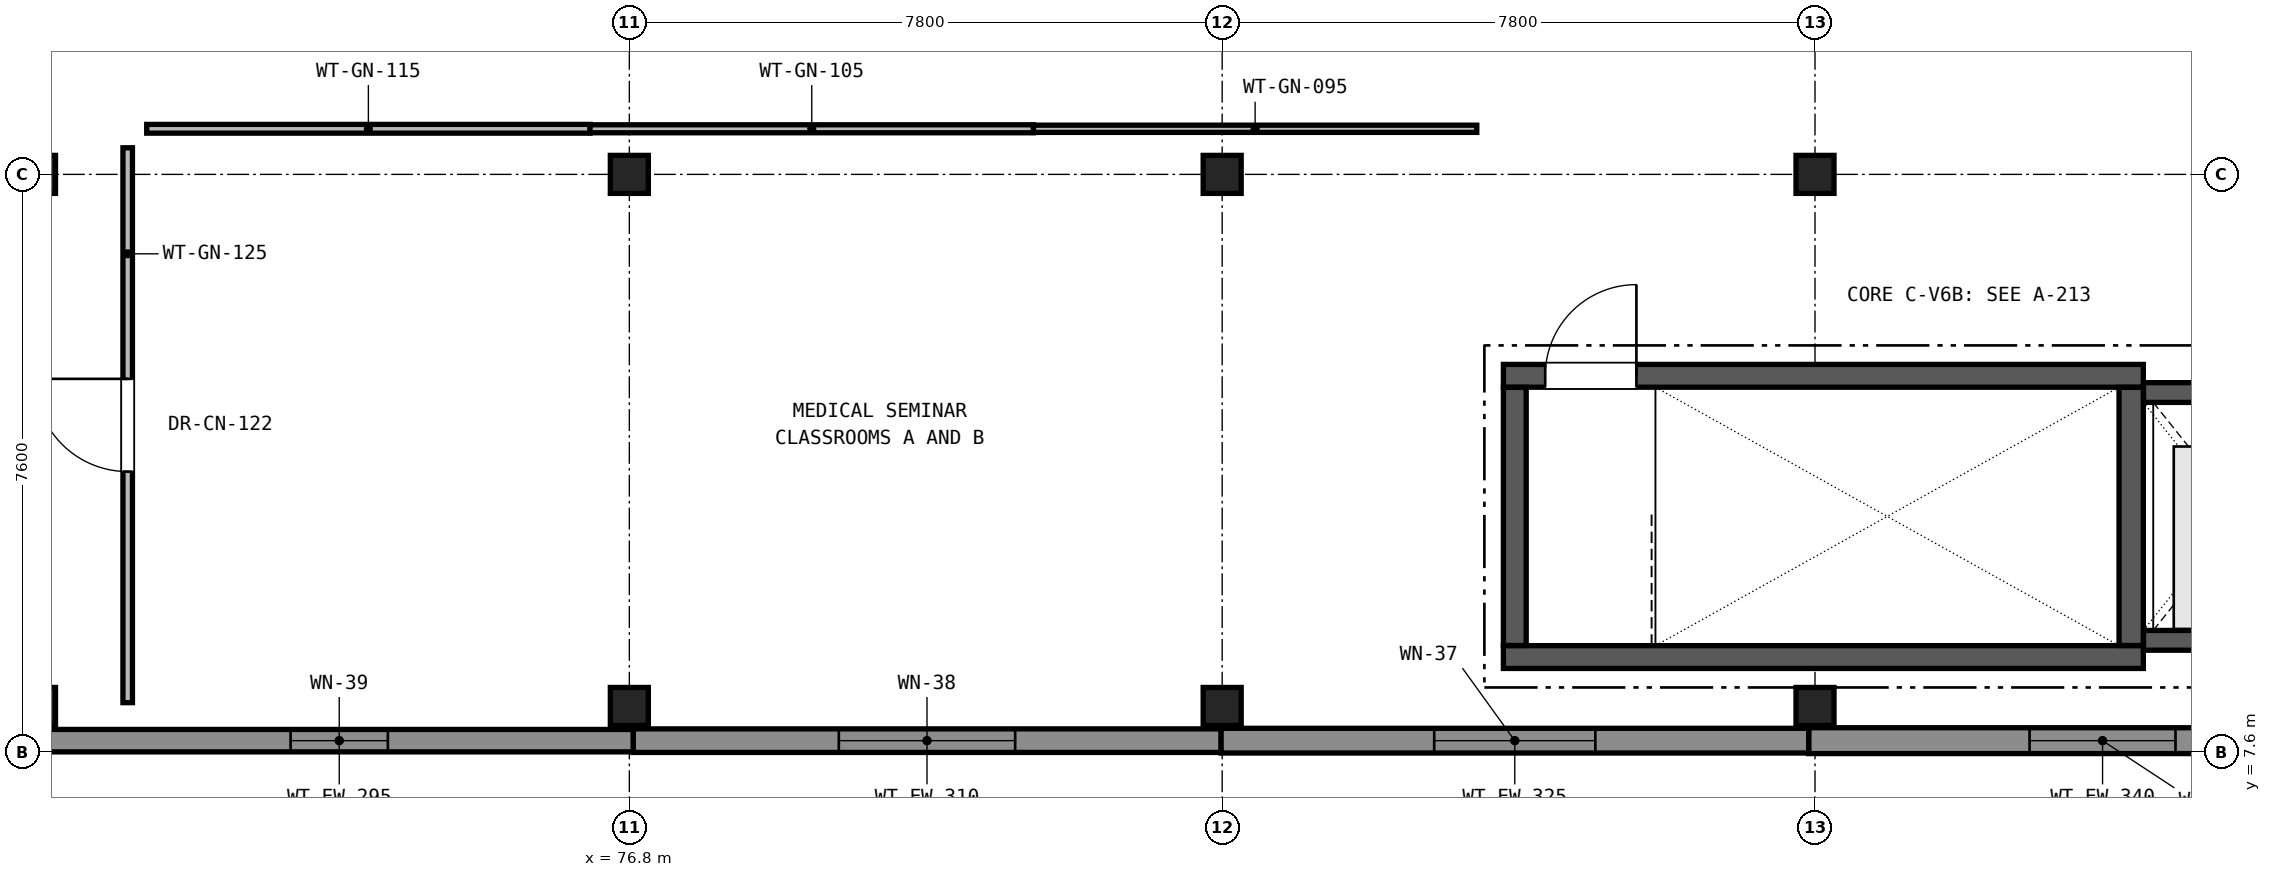
"""IFC4 building model, lengths in metres.
Left out: names, types, materials, properties, quantities, classifications, styles, units other than length and angle.
Written with IfcOpenShell. Run it as: python <this file> out.ifc"""

import sys

from ifc_helpers import new_model, si_unit, direction, frame, frame_2d, origin, origin_2d, place, context, subcontext, project, spatial, rectangle, extrude, element, fill, save


model = new_model("IFC4")
c1 = context("Model", 3, precision=1e-05, world=origin(), true_north=direction((0.0, 1.0)))
c2 = subcontext(c1, "Body", "Model", "MODEL_VIEW")
j1 = project(units=[si_unit("LENGTHUNIT", "METRE"), si_unit("PLANEANGLEUNIT", "RADIAN")], contexts=[c1])
p1 = place(None, origin())
s1 = spatial("IfcSite", under=j1, at=p1, CompositionType="ELEMENT")
p2 = place(p1, origin())
s2 = spatial("IfcBuilding", under=s1, at=p2, CompositionType="ELEMENT")
p3 = place(p2, frame((0.0, 0.0, 17.68)))
s3 = spatial("IfcBuildingStorey", under=s2, at=p3, CompositionType="ELEMENT", Elevation=17.68)
for number, where, z_axis, x_axis in (
    (1, (69.0, 8.2, 0.0), (0.0, 0.0, 1.0), (1.0, 0.0, 0.0)),
    (2, (69.0, 15.2, 0.0), (0.0, 0.0, 1.0), (1.0, 0.0, 0.0)),
    (3, (76.8, 8.2, 0.0), (0.0, 0.0, 1.0), (1.0, 0.0, 0.0)),
    (4, (76.8, 15.2, 0.0), (0.0, 0.0, 1.0), (1.0, 0.0, 0.0)),
    (5, (84.6, 8.2, 0.0), (0.0, 0.0, 1.0), (1.0, 0.0, 0.0)),
    (6, (84.6, 15.2, 0.0), (0.0, 0.0, 1.0), (1.0, 0.0, 0.0)),
    (7, (92.4, 8.2, 0.0), (0.0, 0.0, 1.0), (1.0, 0.0, 0.0)),
    (8, (92.4, 15.2, 0.0), (0.0, 0.0, 1.0), (1.0, 0.0, 0.0)),
):
    element("IfcColumn", number, at=place(p3, frame(where, z_axis=z_axis, x_axis=x_axis)), inside=s3, PredefinedType="COLUMN", context=c2, shape_type="SweptSolid", body=[
        extrude(rectangle(XDim=0.5, YDim=0.5, at=origin_2d()), origin(), (0.0, 0.0, 1.0), 4.08),
    ])
p4 = place(p3, frame((100.05, 7.75, 0.0), z_axis=(0.0, 0.0, 1.0), x_axis=(-1.0, 0.0, 0.0)))
e9 = element("IfcWall", 9, at=p4, inside=s3, PredefinedType="SOLIDWALL", context=c2, shape_type="SweptSolid", body=[
    extrude(rectangle(XDim=7.733, YDim=0.34, at=frame_2d((3.867, 0.0))), origin(), (0.0, 0.0, 1.0), 3.775),
])
p5 = place(p4, frame((2.907, 0.0, 0.9)))
e10 = element("IfcOpeningElement", 10, at=p5, cuts=e9, PredefinedType="OPENING", context=c2, shape_type="SweptSolid", body=[
    extrude(rectangle(XDim=1.92, YDim=1.62, at=frame_2d((0.96, 0.81))), frame((0.0, 0.18, 0.0), z_axis=(0.0, -1.0, 0.0), x_axis=(1.0, 0.0, 0.0)), (0.0, 0.0, 1.0), 0.36),
])
p6 = place(p3, frame((92.317, 7.75, 0.0), z_axis=(0.0, 0.0, 1.0), x_axis=(-1.0, 0.0, 0.0)))
e11 = element("IfcWall", 11, at=p6, inside=s3, PredefinedType="SOLIDWALL", context=c2, shape_type="SweptSolid", body=[
    extrude(rectangle(XDim=7.733, YDim=0.325, at=frame_2d((3.867, 0.0))), origin(), (0.0, 0.0, 1.0), 3.775),
])
p7 = place(p6, frame((2.807, 0.0, 0.9)))
e12 = element("IfcOpeningElement", 12, at=p7, cuts=e11, PredefinedType="OPENING", context=c2, shape_type="SweptSolid", body=[
    extrude(rectangle(XDim=2.12, YDim=1.62, at=frame_2d((1.06, 0.81))), frame((0.0, 0.172, 0.0), z_axis=(0.0, -1.0, 0.0), x_axis=(1.0, 0.0, 0.0)), (0.0, 0.0, 1.0), 0.345),
])
p8 = place(p3, frame((84.583, 7.75, 0.0), z_axis=(0.0, 0.0, 1.0), x_axis=(-1.0, 0.0, 0.0)))
e13 = element("IfcWall", 13, at=p8, inside=s3, PredefinedType="SOLIDWALL", context=c2, shape_type="SweptSolid", body=[
    extrude(rectangle(XDim=7.733, YDim=0.31, at=frame_2d((3.867, 0.0))), origin(), (0.0, 0.0, 1.0), 3.775),
])
p9 = place(p8, frame((2.707, 0.0, 0.9)))
e14 = element("IfcOpeningElement", 14, at=p9, cuts=e13, PredefinedType="OPENING", context=c2, shape_type="SweptSolid", body=[
    extrude(rectangle(XDim=2.32, YDim=1.62, at=frame_2d((1.16, 0.81))), frame((0.0, 0.165, 0.0), z_axis=(0.0, -1.0, 0.0), x_axis=(1.0, 0.0, 0.0)), (0.0, 0.0, 1.0), 0.33),
])
p10 = place(p3, frame((76.85, 7.75, 0.0), z_axis=(0.0, 0.0, 1.0), x_axis=(-1.0, 0.0, 0.0)))
e15 = element("IfcWall", 15, at=p10, inside=s3, PredefinedType="SOLIDWALL", context=c2, shape_type="SweptSolid", body=[
    extrude(rectangle(XDim=7.733, YDim=0.295, at=frame_2d((3.867, 0.0))), origin(), (0.0, 0.0, 1.0), 3.775),
])
p11 = place(p10, frame((3.227, 0.0, 0.9)))
e16 = element("IfcOpeningElement", 16, at=p11, cuts=e15, PredefinedType="OPENING", context=c2, shape_type="SweptSolid", body=[
    extrude(rectangle(XDim=1.28, YDim=1.88, at=frame_2d((0.64, 0.94))), frame((0.0, 0.157, 0.0), z_axis=(0.0, -1.0, 0.0), x_axis=(1.0, 0.0, 0.0)), (0.0, 0.0, 1.0), 0.315),
])
p12 = place(p3, frame((88.3, 8.85, 0.0), z_axis=(0.0, 0.0, 1.0), x_axis=(1.0, 0.0, 0.0)))
e17 = element("IfcWall", 17, at=p12, inside=s3, PredefinedType="SHEAR", context=c2, shape_type="SweptSolid", body=[
    extrude(rectangle(XDim=8.42, YDim=0.3, at=frame_2d((4.21, 0.0))), origin(), (0.0, 0.0, 1.0), 3.775),
])
p13 = place(p3, frame((88.3, 12.55, 0.0), z_axis=(0.0, 0.0, 1.0), x_axis=(1.0, 0.0, 0.0)))
e18 = element("IfcWall", 18, at=p13, inside=s3, PredefinedType="SHEAR", context=c2, shape_type="SweptSolid", body=[
    extrude(rectangle(XDim=8.42, YDim=0.3, at=frame_2d((4.21, 0.0))), origin(), (0.0, 0.0, 1.0), 3.775),
])
p14 = place(p13, frame((0.55, 0.0, 0.0)))
e19 = element("IfcOpeningElement", 19, at=p14, cuts=e18, PredefinedType="OPENING", context=c2, shape_type="SweptSolid", body=[
    extrude(rectangle(XDim=1.2, YDim=2.2, at=frame_2d((0.6, 1.1))), frame((0.0, 0.16, 0.0), z_axis=(0.0, -1.0, 0.0), x_axis=(1.0, 0.0, 0.0)), (0.0, 0.0, 1.0), 0.32),
])
p15 = place(p3, frame((88.45, 9.002, 0.0), z_axis=(0.0, 0.0, 1.0), x_axis=(0.0, 1.0, 0.0)))
e20 = element("IfcWall", 20, at=p15, inside=s3, PredefinedType="SHEAR", context=c2, shape_type="SweptSolid", body=[
    extrude(rectangle(XDim=3.396, YDim=0.3, at=frame_2d((1.698, 0.0))), origin(), (0.0, 0.0, 1.0), 3.775),
])
p16 = place(p3, frame((96.56, 9.002, 0.0), z_axis=(0.0, 0.0, 1.0), x_axis=(0.0, 1.0, 0.0)))
e21 = element("IfcWall", 21, at=p16, inside=s3, PredefinedType="SHEAR", context=c2, shape_type="SweptSolid", body=[
    extrude(rectangle(XDim=3.396, YDim=0.32, at=frame_2d((1.698, 0.0))), origin(), (0.0, 0.0, 1.0), 3.775),
])
p17 = place(p3, frame((96.722, 9.07, 0.0), z_axis=(0.0, 0.0, 1.0), x_axis=(1.0, 0.0, 0.0)))
e22 = element("IfcWall", 22, at=p17, inside=s3, PredefinedType="SHEAR", context=c2, shape_type="SweptSolid", body=[
    extrude(rectangle(XDim=2.658, YDim=0.26, at=frame_2d((1.329, 0.0))), origin(), (0.0, 0.0, 1.0), 3.775),
])
p18 = place(p3, frame((96.722, 12.33, 0.0), z_axis=(0.0, 0.0, 1.0), x_axis=(1.0, 0.0, 0.0)))
e23 = element("IfcWall", 23, at=p18, inside=s3, PredefinedType="SHEAR", context=c2, shape_type="SweptSolid", body=[
    extrude(rectangle(XDim=2.658, YDim=0.26, at=frame_2d((1.329, 0.0))), origin(), (0.0, 0.0, 1.0), 3.775),
])
p19 = place(p18, frame((0.679, 0.0, 0.0)))
e24 = element("IfcOpeningElement", 24, at=p19, cuts=e23, PredefinedType="OPENING", context=c2, shape_type="SweptSolid", body=[
    extrude(rectangle(XDim=1.3, YDim=2.2, at=frame_2d((0.65, 1.1))), frame((0.0, 0.14, 0.0), z_axis=(0.0, -1.0, 0.0), x_axis=(1.0, 0.0, 0.0)), (0.0, 0.0, 1.0), 0.28),
])
p20 = place(p3, frame((70.2, 8.25, 0.0), z_axis=(0.0, 0.0, 1.0), x_axis=(0.0, 1.0, 0.0)))
e25 = element("IfcWall", 25, at=p20, inside=s3, PredefinedType="PARTITIONING", context=c2, shape_type="SweptSolid", body=[
    extrude(rectangle(XDim=7.3, YDim=0.125, at=frame_2d((3.65, 0.0))), origin(), (0.0, 0.0, 1.0), 3.025),
])
p21 = place(p20, frame((3.04, 0.0, 0.0)))
e26 = element("IfcOpeningElement", 26, at=p21, cuts=e25, PredefinedType="OPENING", context=c2, shape_type="SweptSolid", body=[
    extrude(rectangle(XDim=1.22, YDim=2.2, at=frame_2d((0.61, 1.1))), frame((0.0, 0.073, 0.0), z_axis=(0.0, -1.0, 0.0), x_axis=(1.0, 0.0, 0.0)), (0.0, 0.0, 1.0), 0.145),
])
p22 = place(p3, frame((70.45, 15.8, 0.0), z_axis=(0.0, 0.0, 1.0), x_axis=(1.0, 0.0, 0.0)))
e27 = element("IfcWall", 27, at=p22, inside=s3, PredefinedType="PARTITIONING", context=c2, shape_type="SweptSolid", body=[
    extrude(rectangle(XDim=5.833, YDim=0.115, at=frame_2d((2.917, 0.0))), origin(), (0.0, 0.0, 1.0), 3.775),
])
p23 = place(p3, frame((76.283, 15.8, 0.0), z_axis=(0.0, 0.0, 1.0), x_axis=(1.0, 0.0, 0.0)))
e28 = element("IfcWall", 28, at=p23, inside=s3, PredefinedType="PARTITIONING", context=c2, shape_type="SweptSolid", body=[
    extrude(rectangle(XDim=5.834, YDim=0.105, at=frame_2d((2.917, 0.0))), origin(), (0.0, 0.0, 1.0), 3.025),
])
p24 = place(p3, frame((82.117, 15.8, 0.0), z_axis=(0.0, 0.0, 1.0), x_axis=(1.0, 0.0, 0.0)))
e29 = element("IfcWall", 29, at=p24, inside=s3, PredefinedType="PARTITIONING", context=c2, shape_type="SweptSolid", body=[
    extrude(rectangle(XDim=5.833, YDim=0.095, at=frame_2d((2.917, 0.0))), origin(), (0.0, 0.0, 1.0), 3.225),
])
p25 = place(p5, origin())
e30 = element("IfcWindow", 30, at=p25, inside=s3, PartitioningType="SINGLE_PANEL", PredefinedType="WINDOW", context=c2, shape_type="SweptSolid", body=[
    extrude(rectangle(XDim=1.92, YDim=1.62, at=frame_2d((0.96, 0.81))), frame((0.0, 0.03, 0.0), z_axis=(0.0, -1.0, 0.0), x_axis=(1.0, 0.0, 0.0)), (0.0, 0.0, 1.0), 0.06),
])
fill(e10, e30)
p26 = place(p7, origin())
e31 = element("IfcWindow", 31, at=p26, inside=s3, PartitioningType="SINGLE_PANEL", PredefinedType="WINDOW", context=c2, shape_type="SweptSolid", body=[
    extrude(rectangle(XDim=2.12, YDim=1.62, at=frame_2d((1.06, 0.81))), frame((0.0, 0.03, 0.0), z_axis=(0.0, -1.0, 0.0), x_axis=(1.0, 0.0, 0.0)), (0.0, 0.0, 1.0), 0.06),
])
fill(e12, e31)
p27 = place(p9, origin())
e32 = element("IfcWindow", 32, at=p27, inside=s3, PartitioningType="SINGLE_PANEL", PredefinedType="WINDOW", context=c2, shape_type="SweptSolid", body=[
    extrude(rectangle(XDim=2.32, YDim=1.62, at=frame_2d((1.16, 0.81))), frame((0.0, 0.03, 0.0), z_axis=(0.0, -1.0, 0.0), x_axis=(1.0, 0.0, 0.0)), (0.0, 0.0, 1.0), 0.06),
])
fill(e14, e32)
p28 = place(p11, origin())
e33 = element("IfcWindow", 33, at=p28, inside=s3, PartitioningType="SINGLE_PANEL", PredefinedType="WINDOW", context=c2, shape_type="SweptSolid", body=[
    extrude(rectangle(XDim=1.28, YDim=1.88, at=frame_2d((0.64, 0.94))), frame((0.0, 0.03, 0.0), z_axis=(0.0, -1.0, 0.0), x_axis=(1.0, 0.0, 0.0)), (0.0, 0.0, 1.0), 0.06),
])
fill(e16, e33)
p29 = place(p14, origin())
e34 = element("IfcDoor", 34, at=p29, inside=s3, OperationType="SINGLE_SWING_RIGHT", PredefinedType="DOOR", context=c2, shape_type="SweptSolid", body=[
    extrude(rectangle(XDim=1.2, YDim=2.2, at=frame_2d((0.6, 1.1))), frame((0.0, 0.025, 0.0), z_axis=(0.0, -1.0, 0.0), x_axis=(1.0, 0.0, 0.0)), (0.0, 0.0, 1.0), 0.05),
])
fill(e19, e34)
p30 = place(p21, origin())
e35 = element("IfcDoor", 35, at=p30, inside=s3, OperationType="SINGLE_SWING_RIGHT", PredefinedType="DOOR", context=c2, shape_type="SweptSolid", body=[
    extrude(rectangle(XDim=1.22, YDim=2.2, at=frame_2d((0.61, 1.1))), frame((0.0, 0.025, 0.0), z_axis=(0.0, -1.0, 0.0), x_axis=(1.0, 0.0, 0.0)), (0.0, 0.0, 1.0), 0.05),
])
fill(e26, e35)
save(model, sys.argv[1])
